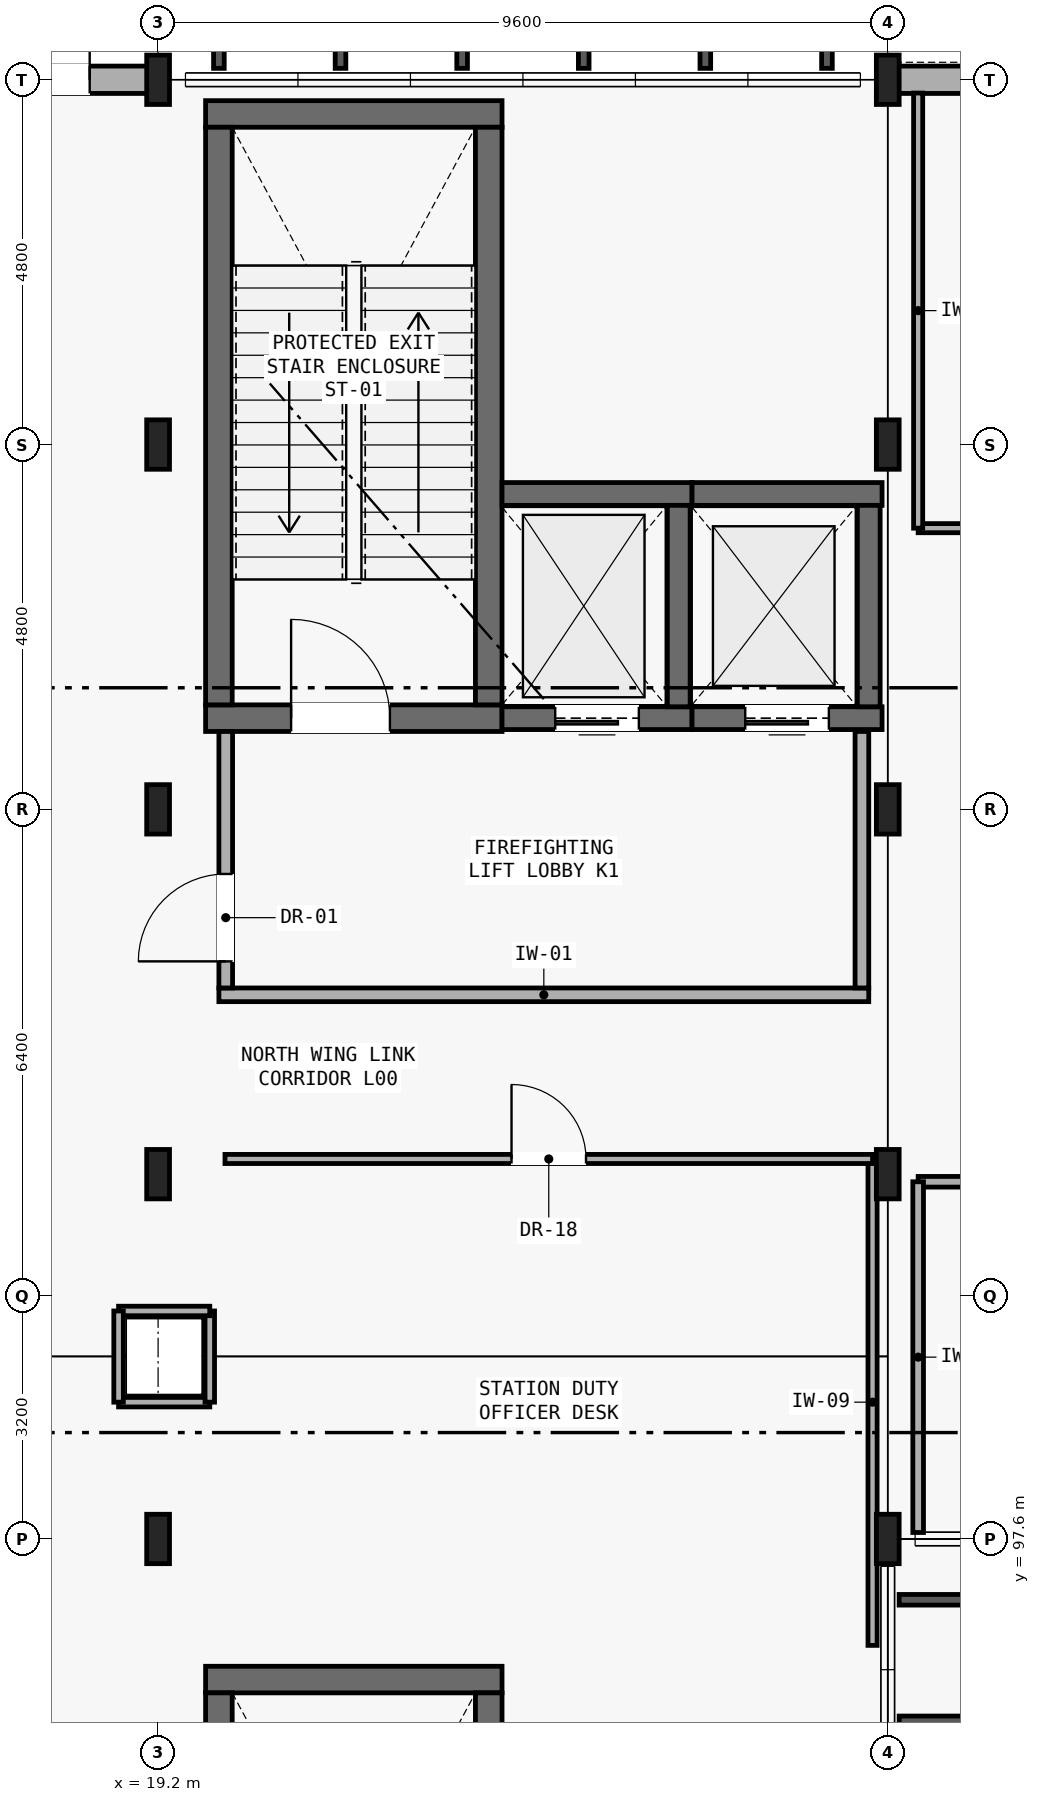
"""IFC4 building model, lengths in metres.
Left out: names, types, materials, properties, quantities, classifications, styles, units other than length and angle.
Written with IfcOpenShell. Run it as: python <this file> out.ifc"""

import sys

from ifc_helpers import new_model, si_unit, direction, frame, frame_2d, origin, origin_2d, place, context, subcontext, project, spatial, rectangle, i_section, extrude, element, fill, save


model = new_model("IFC4")
c1 = context("Model", 3, precision=1e-05, world=origin(), true_north=direction((0.0, 1.0)))
c2 = subcontext(c1, "Body", "Model", "MODEL_VIEW")
j1 = project(units=[si_unit("LENGTHUNIT", "METRE"), si_unit("PLANEANGLEUNIT", "RADIAN")], contexts=[c1])
p1 = place(None, origin())
s1 = spatial("IfcSite", under=j1, at=p1, CompositionType="ELEMENT")
p2 = place(p1, origin())
s2 = spatial("IfcBuilding", under=s1, at=p2, CompositionType="ELEMENT")
p3 = place(p2, origin())
s3 = spatial("IfcBuildingStorey", under=s2, at=p3, CompositionType="ELEMENT", Elevation=0.0)
for number, where, z_axis, x_axis in (
    (1, (28.8, 97.6, 0.0), (0.0, 0.0, 1.0), (1.0, 0.0, 0.0)),
    (2, (28.8, 102.4, 0.0), (0.0, 0.0, 1.0), (1.0, 0.0, 0.0)),
    (3, (28.8, 107.2, 0.0), (0.0, 0.0, 1.0), (1.0, 0.0, 0.0)),
    (4, (28.8, 112.0, 0.0), (0.0, 0.0, 1.0), (1.0, 0.0, 0.0)),
    (5, (28.8, 116.8, 0.0), (0.0, 0.0, 1.0), (1.0, 0.0, 0.0)),
    (6, (19.2, 116.8, 0.0), (0.0, 0.0, 1.0), (1.0, 0.0, 0.0)),
    (7, (19.2, 97.6, 0.0), (0.0, 0.0, 1.0), (1.0, 0.0, 0.0)),
    (8, (19.2, 102.4, 0.0), (0.0, 0.0, 1.0), (1.0, 0.0, 0.0)),
    (9, (19.2, 107.2, 0.0), (0.0, 0.0, 1.0), (1.0, 0.0, 0.0)),
    (10, (19.2, 112.0, 0.0), (0.0, 0.0, 1.0), (1.0, 0.0, 0.0)),
):
    element("IfcColumn", number, at=place(p3, frame(where, z_axis=z_axis, x_axis=x_axis)), inside=s3, PredefinedType="COLUMN", context=c2, shape_type="SweptSolid", body=[
        extrude(i_section(OverallWidth=0.3, OverallDepth=0.65, WebThickness=0.016, FlangeThickness=0.031, FilletRadius=0.027, at=origin_2d()), origin(), (0.0, 0.0, 1.0), 5.25),
    ])
p4 = place(p3, frame((9.61, 116.8, 0.0), z_axis=(0.0, 0.0, 1.0), x_axis=(1.0, 0.0, 0.0)))
e11 = element("IfcWall", 11, at=p4, inside=s3, PredefinedType="SOLIDWALL", context=c2, shape_type="SweptSolid", body=[
    extrude(rectangle(XDim=9.58, YDim=0.36, at=frame_2d((4.79, 0.0))), origin(), (0.0, 0.0, 1.0), 4.08),
])
p5 = place(p4, frame((6.49, 0.0, 0.0)))
e12 = element("IfcOpeningElement", 12, at=p5, cuts=e11, PredefinedType="OPENING", context=c2, shape_type="SweptSolid", body=[
    extrude(rectangle(XDim=2.2, YDim=2.35, at=frame_2d((1.1, 1.175))), frame((0.0, 0.19, 0.0), z_axis=(0.0, -1.0, 0.0), x_axis=(1.0, 0.0, 0.0)), (0.0, 0.0, 1.0), 0.38),
])
p6 = place(p3, frame((28.81, 116.8, 0.0), z_axis=(0.0, 0.0, 1.0), x_axis=(1.0, 0.0, 0.0)))
e13 = element("IfcWall", 13, at=p6, inside=s3, PredefinedType="SOLIDWALL", context=c2, shape_type="SweptSolid", body=[
    extrude(rectangle(XDim=9.58, YDim=0.36, at=frame_2d((4.79, 0.0))), origin(), (0.0, 0.0, 1.0), 4.67),
])
p7 = place(p3, frame((19.825, 108.4, 0.0), z_axis=(0.0, 0.0, 1.0), x_axis=(1.0, 0.0, 0.0)))
e14 = element("IfcWall", 14, at=p7, inside=s3, PredefinedType="SHEAR", context=c2, shape_type="SweptSolid", body=[
    extrude(rectangle(XDim=3.9, YDim=0.35, at=frame_2d((1.95, 0.0))), origin(), (0.0, 0.0, 1.0), 5.0),
])
p8 = place(p7, frame((1.125, 0.0, 0.0)))
e15 = element("IfcOpeningElement", 15, at=p8, cuts=e14, PredefinedType="OPENING", context=c2, shape_type="SweptSolid", body=[
    extrude(rectangle(XDim=1.3, YDim=2.15, at=frame_2d((0.65, 1.075))), frame((0.0, 0.185, 0.0), z_axis=(0.0, -1.0, 0.0), x_axis=(1.0, 0.0, 0.0)), (0.0, 0.0, 1.0), 0.37),
])
p9 = place(p3, frame((19.825, 116.35, 0.0), z_axis=(0.0, 0.0, 1.0), x_axis=(1.0, 0.0, 0.0)))
e16 = element("IfcWall", 16, at=p9, inside=s3, PredefinedType="SHEAR", context=c2, shape_type="SweptSolid", body=[
    extrude(rectangle(XDim=3.9, YDim=0.35, at=frame_2d((1.95, 0.0))), origin(), (0.0, 0.0, 1.0), 5.0),
])
for number, where, z_axis, x_axis in (
    (17, (20.0, 108.575, 0.0), (0.0, 0.0, 1.0), (0.0, 1.0, 0.0)),
    (18, (23.55, 108.575, 0.0), (0.0, 0.0, 1.0), (0.0, 1.0, 0.0)),
):
    element("IfcWall", number, at=place(p3, frame(where, z_axis=z_axis, x_axis=x_axis)), inside=s3, PredefinedType="SHEAR", context=c2, shape_type="SweptSolid", body=[
        extrude(rectangle(XDim=7.6, YDim=0.35, at=frame_2d((3.8, 0.0))), origin(), (0.0, 0.0, 1.0), 5.0),
    ])
p10 = place(p3, frame((23.725, 108.4, 0.0), z_axis=(0.0, 0.0, 1.0), x_axis=(1.0, 0.0, 0.0)))
e19 = element("IfcWall", 19, at=p10, inside=s3, PredefinedType="SHEAR", context=c2, shape_type="SweptSolid", body=[
    extrude(rectangle(XDim=2.5, YDim=0.3, at=frame_2d((1.25, 0.0))), origin(), (0.0, 0.0, 1.0), 5.0),
])
p11 = place(p10, frame((0.7, 0.0, 0.0)))
e20 = element("IfcOpeningElement", 20, at=p11, cuts=e19, PredefinedType="OPENING", context=c2, shape_type="SweptSolid", body=[
    extrude(rectangle(XDim=1.1, YDim=2.1, at=frame_2d((0.55, 1.05))), frame((0.0, 0.16, 0.0), z_axis=(0.0, -1.0, 0.0), x_axis=(1.0, 0.0, 0.0)), (0.0, 0.0, 1.0), 0.32),
])
p12 = place(p3, frame((23.725, 111.35, 0.0), z_axis=(0.0, 0.0, 1.0), x_axis=(1.0, 0.0, 0.0)))
e21 = element("IfcWall", 21, at=p12, inside=s3, PredefinedType="SHEAR", context=c2, shape_type="SweptSolid", body=[
    extrude(rectangle(XDim=2.5, YDim=0.3, at=frame_2d((1.25, 0.0))), origin(), (0.0, 0.0, 1.0), 5.0),
])
p13 = place(p3, frame((26.05, 108.55, 0.0), z_axis=(0.0, 0.0, 1.0), x_axis=(0.0, 1.0, 0.0)))
e22 = element("IfcWall", 22, at=p13, inside=s3, PredefinedType="SHEAR", context=c2, shape_type="SweptSolid", body=[
    extrude(rectangle(XDim=2.65, YDim=0.3, at=frame_2d((1.325, 0.0))), origin(), (0.0, 0.0, 1.0), 5.0),
])
p14 = place(p3, frame((26.225, 108.4, 0.0), z_axis=(0.0, 0.0, 1.0), x_axis=(1.0, 0.0, 0.0)))
e23 = element("IfcWall", 23, at=p14, inside=s3, PredefinedType="SHEAR", context=c2, shape_type="SweptSolid", body=[
    extrude(rectangle(XDim=2.5, YDim=0.3, at=frame_2d((1.25, 0.0))), origin(), (0.0, 0.0, 1.0), 5.0),
])
p15 = place(p14, frame((0.7, 0.0, 0.0)))
e24 = element("IfcOpeningElement", 24, at=p15, cuts=e23, PredefinedType="OPENING", context=c2, shape_type="SweptSolid", body=[
    extrude(rectangle(XDim=1.1, YDim=2.1, at=frame_2d((0.55, 1.05))), frame((0.0, 0.16, 0.0), z_axis=(0.0, -1.0, 0.0), x_axis=(1.0, 0.0, 0.0)), (0.0, 0.0, 1.0), 0.32),
])
p16 = place(p3, frame((26.225, 111.35, 0.0), z_axis=(0.0, 0.0, 1.0), x_axis=(1.0, 0.0, 0.0)))
e25 = element("IfcWall", 25, at=p16, inside=s3, PredefinedType="SHEAR", context=c2, shape_type="SweptSolid", body=[
    extrude(rectangle(XDim=2.5, YDim=0.3, at=frame_2d((1.25, 0.0))), origin(), (0.0, 0.0, 1.0), 5.0),
])
p17 = place(p3, frame((28.55, 108.55, 0.0), z_axis=(0.0, 0.0, 1.0), x_axis=(0.0, 1.0, 0.0)))
e26 = element("IfcWall", 26, at=p17, inside=s3, PredefinedType="SHEAR", context=c2, shape_type="SweptSolid", body=[
    extrude(rectangle(XDim=2.65, YDim=0.3, at=frame_2d((1.325, 0.0))), origin(), (0.0, 0.0, 1.0), 5.0),
])
p18 = place(p3, frame((20.0, 104.76, 0.0), z_axis=(0.0, 0.0, 1.0), x_axis=(1.0, 0.0, 0.0)))
e27 = element("IfcWall", 27, at=p18, inside=s3, PredefinedType="PARTITIONING", context=c2, shape_type="SweptSolid", body=[
    extrude(rectangle(XDim=8.55, YDim=0.18, at=frame_2d((4.275, 0.0))), origin(), (0.0, 0.0, 1.0), 4.48),
])
p19 = place(p3, frame((20.09, 104.85, 0.0), z_axis=(0.0, 0.0, 1.0), x_axis=(0.0, 1.0, 0.0)))
e28 = element("IfcWall", 28, at=p19, inside=s3, PredefinedType="PARTITIONING", context=c2, shape_type="SweptSolid", body=[
    extrude(rectangle(XDim=3.375, YDim=0.18, at=frame_2d((1.688, 0.0))), origin(), (0.0, 0.0, 1.0), 5.0),
])
p20 = place(p19, frame((0.35, 0.0, 0.0)))
e29 = element("IfcOpeningElement", 29, at=p20, cuts=e28, PredefinedType="OPENING", context=c2, shape_type="SweptSolid", body=[
    extrude(rectangle(XDim=1.15, YDim=2.15, at=frame_2d((0.575, 1.075))), frame((0.0, 0.1, 0.0), z_axis=(0.0, -1.0, 0.0), x_axis=(1.0, 0.0, 0.0)), (0.0, 0.0, 1.0), 0.2),
])
p21 = place(p3, frame((28.46, 104.85, 0.0), z_axis=(0.0, 0.0, 1.0), x_axis=(0.0, 1.0, 0.0)))
e30 = element("IfcWall", 30, at=p21, inside=s3, PredefinedType="PARTITIONING", context=c2, shape_type="SweptSolid", body=[
    extrude(rectangle(XDim=3.375, YDim=0.18, at=frame_2d((1.688, 0.0))), origin(), (0.0, 0.0, 1.0), 5.0),
])
p22 = place(p3, frame((19.825, 95.75, 0.0), z_axis=(0.0, 0.0, 1.0), x_axis=(1.0, 0.0, 0.0)))
e31 = element("IfcWall", 31, at=p22, inside=s3, PredefinedType="SHEAR", context=c2, shape_type="SweptSolid", body=[
    extrude(rectangle(XDim=3.9, YDim=0.35, at=frame_2d((1.95, 0.0))), origin(), (0.0, 0.0, 1.0), 5.0),
])
for number, where, z_axis, x_axis in (
    (32, (20.0, 87.975, 0.0), (0.0, 0.0, 1.0), (0.0, 1.0, 0.0)),
    (33, (23.55, 87.975, 0.0), (0.0, 0.0, 1.0), (0.0, 1.0, 0.0)),
):
    element("IfcWall", number, at=place(p3, frame(where, z_axis=z_axis, x_axis=x_axis)), inside=s3, PredefinedType="SHEAR", context=c2, shape_type="SweptSolid", body=[
        extrude(rectangle(XDim=7.6, YDim=0.35, at=frame_2d((3.8, 0.0))), origin(), (0.0, 0.0, 1.0), 5.0),
    ])
p23 = place(p3, frame((18.68, 99.4, 0.0), z_axis=(0.0, 0.0, 1.0), x_axis=(1.0, 0.0, 0.0)))
e34 = element("IfcWall", 34, at=p23, inside=s3, PredefinedType="PARTITIONING", context=c2, shape_type="SweptSolid", body=[
    extrude(rectangle(XDim=1.2, YDim=0.125, at=frame_2d((0.6, 0.0))), origin(), (0.0, 0.0, 1.0), 5.0),
])
p24 = place(p3, frame((19.88, 99.4, 0.0), z_axis=(0.0, 0.0, 1.0), x_axis=(0.0, 1.0, 0.0)))
e35 = element("IfcWall", 35, at=p24, inside=s3, PredefinedType="PARTITIONING", context=c2, shape_type="SweptSolid", body=[
    extrude(rectangle(XDim=1.2, YDim=0.125, at=frame_2d((0.6, 0.0))), origin(), (0.0, 0.0, 1.0), 5.0),
])
p25 = place(p3, frame((19.88, 100.6, 0.0), z_axis=(0.0, 0.0, 1.0), x_axis=(-1.0, 0.0, 0.0)))
e36 = element("IfcWall", 36, at=p25, inside=s3, PredefinedType="PARTITIONING", context=c2, shape_type="SweptSolid", body=[
    extrude(rectangle(XDim=1.2, YDim=0.125, at=frame_2d((0.6, 0.0))), origin(), (0.0, 0.0, 1.0), 5.0),
])
p26 = place(p3, frame((18.68, 100.6, 0.0), z_axis=(0.0, 0.0, 1.0), x_axis=(0.0, -1.0, 0.0)))
e37 = element("IfcWall", 37, at=p26, inside=s3, PredefinedType="PARTITIONING", context=c2, shape_type="SweptSolid", body=[
    extrude(rectangle(XDim=1.2, YDim=0.125, at=frame_2d((0.6, 0.0))), origin(), (0.0, 0.0, 1.0), 5.0),
])
p27 = place(p3, frame((28.6, 96.2, 0.0), z_axis=(0.0, 0.0, 1.0), x_axis=(0.0, 1.0, 0.0)))
e38 = element("IfcWall", 38, at=p27, inside=s3, PredefinedType="PARTITIONING", context=c2, shape_type="SweptSolid", body=[
    extrude(rectangle(XDim=6.4, YDim=0.12, at=frame_2d((3.2, 0.0))), origin(), (0.0, 0.0, 1.0), 4.44),
])
p28 = place(p3, frame((28.6, 102.6, 0.0), z_axis=(0.0, 0.0, 1.0), x_axis=(-1.0, 0.0, 0.0)))
e39 = element("IfcWall", 39, at=p28, inside=s3, PredefinedType="PARTITIONING", context=c2, shape_type="SweptSolid", body=[
    extrude(rectangle(XDim=8.52, YDim=0.12, at=frame_2d((4.26, 0.0))), origin(), (0.0, 0.0, 1.0), 4.08),
])
p29 = place(p28, frame((3.77, 0.0, 0.0)))
e40 = element("IfcOpeningElement", 40, at=p29, cuts=e39, PredefinedType="OPENING", context=c2, shape_type="SweptSolid", body=[
    extrude(rectangle(XDim=0.98, YDim=2.1, at=frame_2d((0.49, 1.05))), frame((0.0, 0.07, 0.0), z_axis=(0.0, -1.0, 0.0), x_axis=(1.0, 0.0, 0.0)), (0.0, 0.0, 1.0), 0.14),
])
p30 = place(p3, frame((29.2, 110.9, 0.0), z_axis=(0.0, 0.0, 1.0), x_axis=(1.0, 0.0, 0.0)))
e41 = element("IfcWall", 41, at=p30, inside=s3, PredefinedType="PARTITIONING", context=c2, shape_type="SweptSolid", body=[
    extrude(rectangle(XDim=28.4, YDim=0.12, at=frame_2d((14.2, 0.0))), origin(), (0.0, 0.0, 1.0), 5.0),
])
p31 = place(p30, frame((13.26, 0.0, 0.0)))
e42 = element("IfcOpeningElement", 42, at=p31, cuts=e41, PredefinedType="OPENING", context=c2, shape_type="SweptSolid", body=[
    extrude(rectangle(XDim=1.88, YDim=2.25, at=frame_2d((0.94, 1.125))), frame((0.0, 0.07, 0.0), z_axis=(0.0, -1.0, 0.0), x_axis=(1.0, 0.0, 0.0)), (0.0, 0.0, 1.0), 0.14),
])
p32 = place(p3, frame((29.2, 116.625, 0.0), z_axis=(0.0, 0.0, 1.0), x_axis=(0.0, -1.0, 0.0)))
e43 = element("IfcWall", 43, at=p32, inside=s3, PredefinedType="PARTITIONING", context=c2, shape_type="SweptSolid", body=[
    extrude(rectangle(XDim=5.725, YDim=0.12, at=frame_2d((2.863, 0.0))), origin(), (0.0, 0.0, 1.0), 5.0),
])
p33 = place(p3, frame((47.4, 102.3, 0.0), z_axis=(0.0, 0.0, 1.0), x_axis=(-1.0, 0.0, 0.0)))
e44 = element("IfcWall", 44, at=p33, inside=s3, PredefinedType="PARTITIONING", context=c2, shape_type="SweptSolid", body=[
    extrude(rectangle(XDim=18.2, YDim=0.14, at=frame_2d((9.1, 0.0))), origin(), (0.0, 0.0, 1.0), 4.44),
])
p34 = place(p33, frame((10.58, 0.0, 0.0)))
e45 = element("IfcOpeningElement", 45, at=p34, cuts=e44, PredefinedType="OPENING", context=c2, shape_type="SweptSolid", body=[
    extrude(rectangle(XDim=1.04, YDim=2.08, at=frame_2d((0.52, 1.04))), frame((0.0, 0.08, 0.0), z_axis=(0.0, -1.0, 0.0), x_axis=(1.0, 0.0, 0.0)), (0.0, 0.0, 1.0), 0.16),
])
p35 = place(p3, frame((29.2, 102.3, 0.0), z_axis=(0.0, 0.0, 1.0), x_axis=(0.0, -1.0, 0.0)))
e46 = element("IfcWall", 46, at=p35, inside=s3, PredefinedType="PARTITIONING", context=c2, shape_type="SweptSolid", body=[
    extrude(rectangle(XDim=4.615, YDim=0.14, at=frame_2d((2.308, 0.0))), origin(), (0.0, 0.0, 1.0), 5.0),
])
p36 = place(p5, origin())
e47 = element("IfcDoor", 47, at=p36, inside=s3, OperationType="SINGLE_SWING_LEFT", PredefinedType="DOOR", context=c2, shape_type="SweptSolid", body=[
    extrude(rectangle(XDim=2.2, YDim=2.35, at=frame_2d((1.1, 1.175))), frame((0.0, 0.025, 0.0), z_axis=(0.0, -1.0, 0.0), x_axis=(1.0, 0.0, 0.0)), (0.0, 0.0, 1.0), 0.05),
])
fill(e12, e47)
p37 = place(p8, origin())
e48 = element("IfcDoor", 48, at=p37, inside=s3, OperationType="SINGLE_SWING_LEFT", PredefinedType="DOOR", context=c2, shape_type="SweptSolid", body=[
    extrude(rectangle(XDim=1.3, YDim=2.15, at=frame_2d((0.65, 1.075))), frame((0.0, 0.025, 0.0), z_axis=(0.0, -1.0, 0.0), x_axis=(1.0, 0.0, 0.0)), (0.0, 0.0, 1.0), 0.05),
])
fill(e15, e48)
p38 = place(p11, frame((1.1, 0.0, 0.0), z_axis=(0.0, 0.0, 1.0), x_axis=(-1.0, 0.0, 0.0)))
e49 = element("IfcDoor", 49, at=p38, inside=s3, OperationType="SLIDING_TO_LEFT", PredefinedType="DOOR", context=c2, shape_type="SweptSolid", body=[
    extrude(rectangle(XDim=1.1, YDim=2.1, at=frame_2d((0.55, 1.05))), frame((0.0, 0.025, 0.0), z_axis=(0.0, -1.0, 0.0), x_axis=(1.0, 0.0, 0.0)), (0.0, 0.0, 1.0), 0.05),
])
fill(e20, e49)
p39 = place(p15, frame((1.1, 0.0, 0.0), z_axis=(0.0, 0.0, 1.0), x_axis=(-1.0, 0.0, 0.0)))
e50 = element("IfcDoor", 50, at=p39, inside=s3, OperationType="SLIDING_TO_LEFT", PredefinedType="DOOR", context=c2, shape_type="SweptSolid", body=[
    extrude(rectangle(XDim=1.1, YDim=2.1, at=frame_2d((0.55, 1.05))), frame((0.0, 0.025, 0.0), z_axis=(0.0, -1.0, 0.0), x_axis=(1.0, 0.0, 0.0)), (0.0, 0.0, 1.0), 0.05),
])
fill(e24, e50)
p40 = place(p20, origin())
e51 = element("IfcDoor", 51, at=p40, inside=s3, OperationType="SINGLE_SWING_LEFT", PredefinedType="DOOR", context=c2, shape_type="SweptSolid", body=[
    extrude(rectangle(XDim=1.15, YDim=2.15, at=frame_2d((0.575, 1.075))), frame((0.0, 0.025, 0.0), z_axis=(0.0, -1.0, 0.0), x_axis=(1.0, 0.0, 0.0)), (0.0, 0.0, 1.0), 0.05),
])
fill(e29, e51)
p41 = place(p29, frame((0.98, 0.0, 0.0), z_axis=(0.0, 0.0, 1.0), x_axis=(-1.0, 0.0, 0.0)))
e52 = element("IfcDoor", 52, at=p41, inside=s3, OperationType="SINGLE_SWING_RIGHT", PredefinedType="DOOR", context=c2, shape_type="SweptSolid", body=[
    extrude(rectangle(XDim=0.98, YDim=2.1, at=frame_2d((0.49, 1.05))), frame((0.0, 0.025, 0.0), z_axis=(0.0, -1.0, 0.0), x_axis=(1.0, 0.0, 0.0)), (0.0, 0.0, 1.0), 0.05),
])
fill(e40, e52)
save(model, sys.argv[1])
